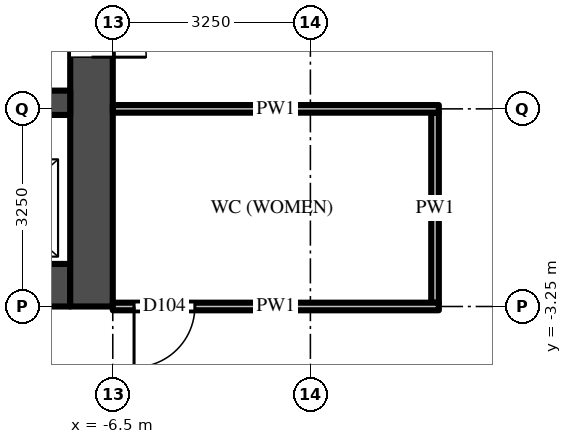
"""IFC4 building model, lengths in metres.
Left out: names, types, materials, properties, quantities, classifications, styles, units other than length and angle.
Written with IfcOpenShell. Run it as: python <this file> out.ifc"""

import sys

from ifc_helpers import new_model, si_unit, direction, frame, frame_2d, origin, place, context, subcontext, project, spatial, rectangle, extrude, source, transform, mapped, element, fill, save


model = new_model("IFC4")
c1 = context("Model", 3, precision=1e-05, world=origin(), true_north=direction((0.0, 1.0)))
c2 = subcontext(c1, "Body", "Model", "MODEL_VIEW")
j1 = project(units=[si_unit("LENGTHUNIT", "METRE"), si_unit("PLANEANGLEUNIT", "RADIAN")], contexts=[c1])
p1 = place(None, origin())
s1 = spatial("IfcSite", under=j1, at=p1, CompositionType="ELEMENT")
p2 = place(p1, origin())
s2 = spatial("IfcBuilding", under=s1, at=p2, CompositionType="ELEMENT")
p3 = place(p2, frame((0.0, 0.0, 189.3)))
s3 = spatial("IfcBuildingStorey", under=s2, at=p3, CompositionType="ELEMENT", Elevation=189.3)
m1 = source(origin(), c2, "Body", "SweptSolid", [
    extrude(rectangle(XDim=14.85, YDim=0.7, at=frame_2d((7.425, 0.0))), origin(), (0.0, 0.0, 1.0), 3.7),
])
p4 = place(p3, frame((-7.2, -2.9, 0.0), z_axis=(0.0, 0.0, 1.0), x_axis=(-1.0, 0.0, 0.0)))
e1 = element("IfcWall", 1, at=p4, inside=s3, PredefinedType="SHEAR", context=c2, shape_type="MappedRepresentation", body=[
    mapped(m1, transform((0.0, 0.0, 0.0))),
])
m2 = source(origin(), c2, "Body", "SweptSolid", [
    extrude(rectangle(XDim=1.1, YDim=2.1, at=frame_2d((0.55, 1.05))), frame((0.0, 0.36, 0.0), z_axis=(0.0, -1.0, 0.0), x_axis=(1.0, 0.0, 0.0)), (0.0, 0.0, 1.0), 0.72),
])
p5 = place(p4, frame((0.55, 0.0, 0.0)))
e2 = element("IfcOpeningElement", 2, at=p5, cuts=e1, PredefinedType="OPENING", context=c2, shape_type="MappedRepresentation", body=[
    mapped(m2, transform((0.0, 0.0, 0.0))),
])
p6 = place(p4, frame((3.15, 0.0, 0.0)))
e3 = element("IfcOpeningElement", 3, at=p6, cuts=e1, PredefinedType="OPENING", context=c2, shape_type="MappedRepresentation", body=[
    mapped(m2, transform((0.0, 0.0, 0.0))),
])
m3 = source(origin(), c2, "Body", "SweptSolid", [
    extrude(rectangle(XDim=1.2, YDim=2.1, at=frame_2d((0.6, 1.05))), frame((0.0, 0.36, 0.0), z_axis=(0.0, -1.0, 0.0), x_axis=(1.0, 0.0, 0.0)), (0.0, 0.0, 1.0), 0.72),
])
p7 = place(p4, frame((5.7, 0.0, 0.0)))
e4 = element("IfcOpeningElement", 4, at=p7, cuts=e1, PredefinedType="OPENING", context=c2, shape_type="MappedRepresentation", body=[
    mapped(m3, transform((0.0, 0.0, 0.0))),
])
m4 = source(origin(), c2, "Body", "SweptSolid", [
    extrude(rectangle(XDim=1.3, YDim=2.1, at=frame_2d((0.65, 1.05))), frame((0.0, 0.36, 0.0), z_axis=(0.0, -1.0, 0.0), x_axis=(1.0, 0.0, 0.0)), (0.0, 0.0, 1.0), 0.72),
])
p8 = place(p4, frame((12.2, 0.0, 0.0)))
e5 = element("IfcOpeningElement", 5, at=p8, cuts=e1, PredefinedType="OPENING", context=c2, shape_type="MappedRepresentation", body=[
    mapped(m4, transform((0.0, 0.0, 0.0))),
])
p9 = place(p4, frame((9.85, 0.0, 0.0)))
e6 = element("IfcOpeningElement", 6, at=p9, cuts=e1, PredefinedType="OPENING", context=c2, shape_type="MappedRepresentation", body=[
    mapped(m3, transform((0.0, 0.0, 0.0))),
])
m5 = source(origin(), c2, "Body", "SweptSolid", [
    extrude(rectangle(XDim=1.0, YDim=2.1, at=frame_2d((0.5, 1.05))), frame((0.0, 0.36, 0.0), z_axis=(0.0, -1.0, 0.0), x_axis=(1.0, 0.0, 0.0)), (0.0, 0.0, 1.0), 0.72),
])
p10 = place(p4, frame((7.9, 0.0, 0.0)))
e7 = element("IfcOpeningElement", 7, at=p10, cuts=e1, PredefinedType="OPENING", context=c2, shape_type="MappedRepresentation", body=[
    mapped(m5, transform((0.0, 0.0, 0.0))),
])
m6 = source(origin(), c2, "Body", "SweptSolid", [
    extrude(rectangle(XDim=9.05, YDim=0.7, at=frame_2d((4.525, 0.0))), origin(), (0.0, 0.0, 1.0), 3.7),
])
p11 = place(p3, frame((-6.85, 5.8, 0.0), z_axis=(0.0, 0.0, 1.0), x_axis=(0.0, -1.0, 0.0)))
e8 = element("IfcWall", 8, at=p11, inside=s3, PredefinedType="SHEAR", context=c2, shape_type="MappedRepresentation", body=[
    mapped(m6, transform((0.0, 0.0, 0.0))),
])
m7 = source(origin(), c2, "Body", "SweptSolid", [
    extrude(rectangle(XDim=1.8, YDim=2.1, at=frame_2d((0.9, 1.05))), frame((0.0, 0.36, 0.0), z_axis=(0.0, -1.0, 0.0), x_axis=(1.0, 0.0, 0.0)), (0.0, 0.0, 1.0), 0.72),
])
p12 = place(p11, frame((3.15, 0.0, 0.0)))
e9 = element("IfcOpeningElement", 9, at=p12, cuts=e8, PredefinedType="OPENING", context=c2, shape_type="MappedRepresentation", body=[
    mapped(m7, transform((0.0, 0.0, 0.0))),
])
m8 = source(origin(), c2, "Body", "SweptSolid", [
    extrude(rectangle(XDim=14.85, YDim=0.4, at=frame_2d((7.425, 0.0))), origin(), (0.0, 0.0, 1.0), 3.7),
])
p13 = place(p3, frame((-7.2, 0.1, 0.0), z_axis=(0.0, 0.0, 1.0), x_axis=(-1.0, 0.0, 0.0)))
e10 = element("IfcWall", 10, at=p13, inside=s3, PredefinedType="SHEAR", context=c2, shape_type="MappedRepresentation", body=[
    mapped(m8, transform((0.0, 0.0, 0.0))),
])
m9 = source(origin(), c2, "Body", "SweptSolid", [
    extrude(rectangle(XDim=1.0, YDim=2.1, at=frame_2d((0.5, 1.05))), frame((0.0, 0.21, 0.0), z_axis=(0.0, -1.0, 0.0), x_axis=(1.0, 0.0, 0.0)), (0.0, 0.0, 1.0), 0.42),
])
p14 = place(p13, frame((7.9, 0.0, 0.0)))
e11 = element("IfcOpeningElement", 11, at=p14, cuts=e10, PredefinedType="OPENING", context=c2, shape_type="MappedRepresentation", body=[
    mapped(m9, transform((0.0, 0.0, 0.0))),
])
m10 = source(origin(), c2, "Body", "SweptSolid", [
    extrude(rectangle(XDim=3.125, YDim=0.125, at=frame_2d((1.562, 0.0))), origin(), (0.0, 0.0, 1.0), 3.068),
])
p15 = place(p3, frame((-1.2, -0.062, 0.0), z_axis=(0.0, 0.0, 1.0), x_axis=(0.0, -1.0, 0.0)))
e12 = element("IfcWall", 12, at=p15, inside=s3, PredefinedType="PARTITIONING", context=c2, shape_type="MappedRepresentation", body=[
    mapped(m10, transform((0.0, 0.0, 0.0))),
])
m11 = source(origin(), c2, "Body", "SweptSolid", [
    extrude(rectangle(XDim=5.363, YDim=0.125, at=frame_2d((2.681, 0.0))), origin(), (0.0, 0.0, 1.0), 2.996),
])
p16 = place(p3, frame((-1.137, -3.25, 0.0), z_axis=(0.0, 0.0, 1.0), x_axis=(-1.0, 0.0, 0.0)))
e13 = element("IfcWall", 13, at=p16, inside=s3, PredefinedType="PARTITIONING", context=c2, shape_type="MappedRepresentation", body=[
    mapped(m11, transform((0.0, 0.0, 0.0))),
])
m12 = source(origin(), c2, "Body", "SweptSolid", [
    extrude(rectangle(XDim=1.0, YDim=2.1, at=frame_2d((0.5, 1.05))), frame((0.0, 0.073, 0.0), z_axis=(0.0, -1.0, 0.0), x_axis=(1.0, 0.0, 0.0)), (0.0, 0.0, 1.0), 0.145),
])
p17 = place(p16, frame((4.012, 0.0, 0.0)))
e14 = element("IfcOpeningElement", 14, at=p17, cuts=e13, PredefinedType="OPENING", context=c2, shape_type="MappedRepresentation", body=[
    mapped(m12, transform((0.0, 0.0, 0.0))),
])
p18 = place(p3, frame((-1.137, 0.0, 0.0), z_axis=(0.0, 0.0, 1.0), x_axis=(-1.0, 0.0, 0.0)))
e15 = element("IfcWall", 15, at=p18, inside=s3, PredefinedType="PARTITIONING", context=c2, shape_type="MappedRepresentation", body=[
    mapped(m11, transform((0.0, 0.0, 0.0))),
])
m13 = source(origin(), c2, "Body", "SweptSolid", [
    extrude(rectangle(XDim=1.8, YDim=2.1, at=frame_2d((0.9, 1.05))), frame((0.0, -0.275, 0.0), z_axis=(0.0, -1.0, 0.0), x_axis=(1.0, 0.0, 0.0)), (0.0, 0.0, 1.0), 0.05),
])
p19 = place(p12, origin())
e16 = element("IfcDoor", 16, at=p19, inside=s3, OperationType="DOUBLE_DOOR_SINGLE_SWING", PredefinedType="DOOR", context=c2, shape_type="MappedRepresentation", body=[
    mapped(m13, transform((0.0, 0.0, 0.0))),
])
fill(e9, e16)
m14 = source(origin(), c2, "Body", "SweptSolid", [
    extrude(rectangle(XDim=1.0, YDim=2.1, at=frame_2d((0.5, 1.05))), frame((0.0, 0.025, 0.0), z_axis=(0.0, -1.0, 0.0), x_axis=(1.0, 0.0, 0.0)), (0.0, 0.0, 1.0), 0.05),
])
p20 = place(p17, origin())
e17 = element("IfcDoor", 17, at=p20, inside=s3, OperationType="SINGLE_SWING_RIGHT", PredefinedType="DOOR", context=c2, shape_type="MappedRepresentation", body=[
    mapped(m14, transform((0.0, 0.0, 0.0))),
])
fill(e14, e17)
save(model, sys.argv[1])
